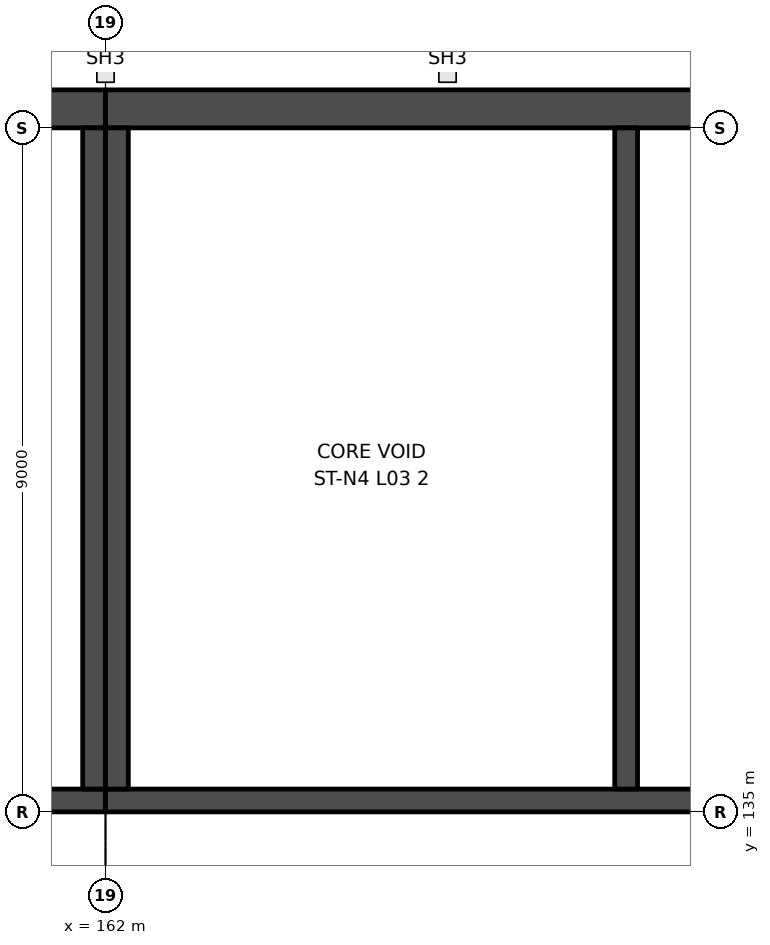
"""IFC4 building model, lengths in metres.
Left out: names, types, materials, properties, quantities, classifications, styles, units other than length and angle.
Written with IfcOpenShell. Run it as: python <this file> out.ifc"""

import sys

from ifc_helpers import new_model, si_unit, direction, frame, frame_2d, origin, place, context, subcontext, project, spatial, rectangle, extrude, element, save


model = new_model("IFC4")
c1 = context("Model", 3, precision=1e-05, world=origin(), true_north=direction((0.0, 1.0)))
c2 = subcontext(c1, "Body", "Model", "MODEL_VIEW")
j1 = project(units=[si_unit("LENGTHUNIT", "METRE"), si_unit("PLANEANGLEUNIT", "RADIAN")], contexts=[c1])
p1 = place(None, origin())
s1 = spatial("IfcSite", under=j1, at=p1, CompositionType="ELEMENT")
p2 = place(p1, origin())
s2 = spatial("IfcBuilding", under=s1, at=p2, CompositionType="ELEMENT")
p3 = place(p2, frame((0.0, 0.0, 22.0)))
s3 = spatial("IfcBuildingStorey", under=s2, at=p3, CompositionType="ELEMENT", Elevation=22.0)
p4 = place(p3, frame((144.0, 135.15, 0.0), z_axis=(0.0, 0.0, 1.0), x_axis=(1.0, 0.0, 0.0)))
e1 = element("IfcWall", 1, at=p4, inside=s3, PredefinedType="SHEAR", context=c2, shape_type="SweptSolid", body=[
    extrude(rectangle(XDim=18.0, YDim=0.3, at=frame_2d((9.0, 0.0))), origin(), (0.0, 0.0, 1.0), 6.0),
])
p5 = place(p4, frame((8.6, 0.0, 0.0)))
e2 = element("IfcOpeningElement", 2, at=p5, cuts=e1, PredefinedType="OPENING", context=c2, shape_type="SweptSolid", body=[
    extrude(rectangle(XDim=1.2, YDim=2.1, at=frame_2d((0.6, 1.05))), frame((0.0, 0.16, 0.0), z_axis=(0.0, -1.0, 0.0), x_axis=(1.0, 0.0, 0.0)), (0.0, 0.0, 1.0), 0.32),
])
p6 = place(p3, frame((144.0, 144.25, 0.0), z_axis=(0.0, 0.0, 1.0), x_axis=(1.0, 0.0, 0.0)))
e3 = element("IfcWall", 3, at=p6, inside=s3, PredefinedType="SHEAR", context=c2, shape_type="SweptSolid", body=[
    extrude(rectangle(XDim=18.0, YDim=0.5, at=frame_2d((9.0, 0.0))), origin(), (0.0, 0.0, 1.0), 6.0),
])
p7 = place(p3, frame((161.85, 135.3, 0.0), z_axis=(0.0, 0.0, 1.0), x_axis=(0.0, 1.0, 0.0)))
e4 = element("IfcWall", 4, at=p7, inside=s3, PredefinedType="SHEAR", context=c2, shape_type="SweptSolid", body=[
    extrude(rectangle(XDim=8.7, YDim=0.3, at=frame_2d((4.35, 0.0))), origin(), (0.0, 0.0, 1.0), 6.0),
])
p8 = place(p3, frame((180.0, 135.15, 0.0), z_axis=(0.0, 0.0, 1.0), x_axis=(-1.0, 0.0, 0.0)))
e5 = element("IfcWall", 5, at=p8, inside=s3, PredefinedType="SHEAR", context=c2, shape_type="SweptSolid", body=[
    extrude(rectangle(XDim=18.0, YDim=0.3, at=frame_2d((9.0, 0.0))), origin(), (0.0, 0.0, 1.0), 6.0),
])
p9 = place(p8, frame((1.5, 0.0, 0.0)))
e6 = element("IfcOpeningElement", 6, at=p9, cuts=e5, PredefinedType="OPENING", context=c2, shape_type="SweptSolid", body=[
    extrude(rectangle(XDim=1.2, YDim=2.1, at=frame_2d((0.6, 1.05))), frame((0.0, 0.16, 0.0), z_axis=(0.0, -1.0, 0.0), x_axis=(1.0, 0.0, 0.0)), (0.0, 0.0, 1.0), 0.32),
])
p10 = place(p3, frame((180.0, 144.25, 0.0), z_axis=(0.0, 0.0, 1.0), x_axis=(-1.0, 0.0, 0.0)))
e7 = element("IfcWall", 7, at=p10, inside=s3, PredefinedType="SHEAR", context=c2, shape_type="SweptSolid", body=[
    extrude(rectangle(XDim=18.0, YDim=0.5, at=frame_2d((9.0, 0.0))), origin(), (0.0, 0.0, 1.0), 6.0),
])
for number, where, z_axis, x_axis in (
    (8, (162.15, 135.3, 0.0), (0.0, 0.0, 1.0), (0.0, 1.0, 0.0)),
    (9, (168.85, 135.3, 0.0), (0.0, 0.0, 1.0), (0.0, 1.0, 0.0)),
):
    element("IfcWall", number, at=place(p3, frame(where, z_axis=z_axis, x_axis=x_axis)), inside=s3, PredefinedType="SHEAR", context=c2, shape_type="SweptSolid", body=[
        extrude(rectangle(XDim=8.7, YDim=0.3, at=frame_2d((4.35, 0.0))), origin(), (0.0, 0.0, 1.0), 6.0),
    ])
save(model, sys.argv[1])
